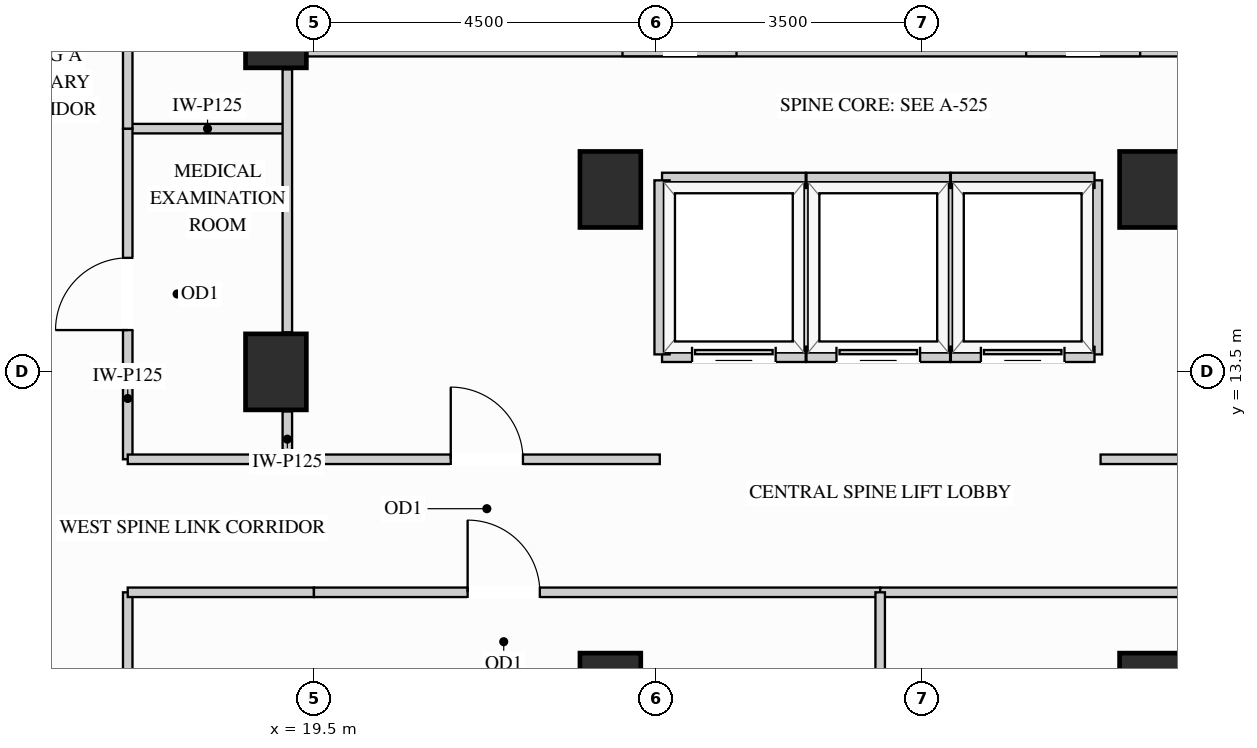
"""IFC4 building model, lengths in metres.
Left out: names, types, materials, properties, quantities, classifications, styles, units other than length and angle.
Written with IfcOpenShell. Run it as: python <this file> out.ifc"""

import sys

from ifc_helpers import new_model, si_unit, direction, frame, frame_2d, origin, origin_2d, place, context, subcontext, project, spatial, rectangle, extrude, source, transform, mapped, element, fill, save


model = new_model("IFC4")
c1 = context("Model", 3, precision=1e-05, world=origin(), true_north=direction((0.0, 1.0)))
c2 = subcontext(c1, "Body", "Model", "MODEL_VIEW")
j1 = project(units=[si_unit("LENGTHUNIT", "METRE"), si_unit("PLANEANGLEUNIT", "RADIAN")], contexts=[c1])
p1 = place(None, origin())
s1 = spatial("IfcSite", under=j1, at=p1, CompositionType="ELEMENT")
p2 = place(p1, origin())
s2 = spatial("IfcBuilding", under=s1, at=p2, CompositionType="ELEMENT")
p3 = place(p2, frame((0.0, 0.0, 157.5)))
s3 = spatial("IfcBuildingStorey", under=s2, at=p3, CompositionType="ELEMENT", Elevation=157.5)
m1 = source(origin(), c2, "Body", "SweptSolid", [
    extrude(rectangle(XDim=0.8, YDim=1.0, at=origin_2d()), origin(), (0.0, 0.0, 1.0), 3.4),
])
for number, where, z_axis, x_axis in (
    (1, (19.0, 13.5, 0.0), (0.0, 0.0, 1.0), (1.0, 0.0, 0.0)),
    (2, (19.0, 18.0, 0.0), (0.0, 0.0, 1.0), (1.0, 0.0, 0.0)),
    (3, (23.4, 15.9, 0.0), (0.0, 0.0, 1.0), (1.0, 0.0, 0.0)),
    (4, (23.4, 9.3, 0.0), (0.0, 0.0, 1.0), (1.0, 0.0, 0.0)),
    (5, (30.5, 15.9, 0.0), (0.0, 0.0, 1.0), (1.0, 0.0, 0.0)),
    (6, (30.5, 9.3, 0.0), (0.0, 0.0, 1.0), (1.0, 0.0, 0.0)),
):
    element("IfcColumn", number, at=place(p3, frame(where, z_axis=z_axis, x_axis=x_axis)), inside=s3, PredefinedType="COLUMN", context=c2, shape_type="MappedRepresentation", body=[
        mapped(m1, transform((0.0, 0.0, 0.0), x_axis=(1.0, 0.0, 0.0), y_axis=(0.0, 1.0, 0.0), z_axis=(0.0, 0.0, 1.0))),
    ])
p4 = place(p3, frame((34.502, 17.825, 0.0), z_axis=(0.0, 0.0, 1.0), x_axis=(-1.0, 0.0, 0.0)))
e7 = element("IfcWall", 7, at=p4, inside=s3, PredefinedType="SOLIDWALL", context=c2, shape_type="SweptSolid", body=[
    extrude(rectangle(XDim=15.104, YDim=0.35, at=frame_2d((7.552, 0.0))), origin(), (0.0, 0.0, 1.0), 3.385),
])
p5 = place(p4, frame((4.131, 0.0, 0.78)))
e8 = element("IfcOpeningElement", 8, at=p5, cuts=e7, PredefinedType="OPENING", context=c2, shape_type="SweptSolid", body=[
    extrude(rectangle(XDim=1.5, YDim=2.0, at=frame_2d((0.75, 1.0))), frame((0.0, 0.185, 0.0), z_axis=(0.0, -1.0, 0.0), x_axis=(1.0, 0.0, 0.0)), (0.0, 0.0, 1.0), 0.37),
])
p6 = place(p4, frame((9.442, 0.0, 0.78)))
e9 = element("IfcOpeningElement", 9, at=p6, cuts=e7, PredefinedType="OPENING", context=c2, shape_type="SweptSolid", body=[
    extrude(rectangle(XDim=1.5, YDim=2.0, at=frame_2d((0.75, 1.0))), frame((0.0, 0.185, 0.0), z_axis=(0.0, -1.0, 0.0), x_axis=(1.0, 0.0, 0.0)), (0.0, 0.0, 1.0), 0.37),
])
m2 = source(origin(), c2, "Body", "SweptSolid", [
    extrude(rectangle(XDim=2.1, YDim=0.125, at=frame_2d((1.05, 0.0))), origin(), (0.0, 0.0, 1.0), 2.916),
])
p7 = place(p3, frame((17.05, 16.7, 0.0), z_axis=(0.0, 0.0, 1.0), x_axis=(1.0, 0.0, 0.0)))
e10 = element("IfcWall", 10, at=p7, inside=s3, PredefinedType="PARTITIONING", context=c2, shape_type="MappedRepresentation", body=[
    mapped(m2, transform((0.0, 0.0, 0.0), x_axis=(1.0, 0.0, 0.0), y_axis=(0.0, 1.0, 0.0), z_axis=(0.0, 0.0, 1.0))),
])
m3 = source(origin(), c2, "Body", "SweptSolid", [
    extrude(rectangle(XDim=0.63, YDim=0.125, at=frame_2d((0.315, 0.0))), origin(), (0.0, 0.0, 1.0), 2.773),
])
p8 = place(p3, frame((19.15, 12.35, 0.0), z_axis=(0.0, 0.0, 1.0), x_axis=(0.0, 1.0, 0.0)))
e11 = element("IfcWall", 11, at=p8, inside=s3, PredefinedType="PARTITIONING", context=c2, shape_type="MappedRepresentation", body=[
    mapped(m3, transform((0.0, 0.0, 0.0), x_axis=(1.0, 0.0, 0.0), y_axis=(0.0, 1.0, 0.0), z_axis=(0.0, 0.0, 1.0))),
])
m4 = source(origin(), c2, "Body", "SweptSolid", [
    extrude(rectangle(XDim=3.46, YDim=0.125, at=frame_2d((1.73, 0.0))), origin(), (0.0, 0.0, 1.0), 2.773),
])
p9 = place(p3, frame((19.15, 14.02, 0.0), z_axis=(0.0, 0.0, 1.0), x_axis=(0.0, 1.0, 0.0)))
e12 = element("IfcWall", 12, at=p9, inside=s3, PredefinedType="PARTITIONING", context=c2, shape_type="MappedRepresentation", body=[
    mapped(m4, transform((0.0, 0.0, 0.0), x_axis=(1.0, 0.0, 0.0), y_axis=(0.0, 1.0, 0.0), z_axis=(0.0, 0.0, 1.0))),
])
p10 = place(p3, frame((17.05, 12.35, 0.0), z_axis=(0.0, 0.0, 1.0), x_axis=(0.0, 1.0, 0.0)))
e13 = element("IfcWall", 13, at=p10, inside=s3, PredefinedType="PARTITIONING", context=c2, shape_type="SweptSolid", body=[
    extrude(rectangle(XDim=4.35, YDim=0.125, at=frame_2d((2.175, 0.0))), origin(), (0.0, 0.0, 1.0), 3.385),
])
p11 = place(p10, frame((1.7, 0.0, 0.0)))
e14 = element("IfcOpeningElement", 14, at=p11, cuts=e13, PredefinedType="OPENING", context=c2, shape_type="SweptSolid", body=[
    extrude(rectangle(XDim=0.95, YDim=2.15, at=frame_2d((0.475, 1.075))), frame((0.0, 0.073, 0.0), z_axis=(0.0, -1.0, 0.0), x_axis=(1.0, 0.0, 0.0)), (0.0, 0.0, 1.0), 0.145),
])
p12 = place(p3, frame((17.05, 16.7, 0.0), z_axis=(0.0, 0.0, 1.0), x_axis=(0.0, 1.0, 0.0)))
e15 = element("IfcWall", 15, at=p12, inside=s3, PredefinedType="PARTITIONING", context=c2, shape_type="SweptSolid", body=[
    extrude(rectangle(XDim=6.65, YDim=0.125, at=frame_2d((3.325, 0.0))), origin(), (0.0, 0.0, 1.0), 3.385),
])
p13 = place(p12, frame((2.85, 0.0, 0.0)))
e16 = element("IfcOpeningElement", 16, at=p13, cuts=e15, PredefinedType="OPENING", context=c2, shape_type="SweptSolid", body=[
    extrude(rectangle(XDim=0.95, YDim=2.15, at=frame_2d((0.475, 1.075))), frame((0.0, 0.073, 0.0), z_axis=(0.0, -1.0, 0.0), x_axis=(1.0, 0.0, 0.0)), (0.0, 0.0, 1.0), 0.145),
])
p14 = place(p3, frame((17.05, 5.75, 0.0), z_axis=(0.0, 0.0, 1.0), x_axis=(0.0, 1.0, 0.0)))
e17 = element("IfcWall", 17, at=p14, inside=s3, PredefinedType="PARTITIONING", context=c2, shape_type="SweptSolid", body=[
    extrude(rectangle(XDim=4.85, YDim=0.125, at=frame_2d((2.425, 0.0))), origin(), (0.0, 0.0, 1.0), 3.385),
])
p15 = place(p14, frame((1.95, 0.0, 0.0)))
e18 = element("IfcOpeningElement", 18, at=p15, cuts=e17, PredefinedType="OPENING", context=c2, shape_type="SweptSolid", body=[
    extrude(rectangle(XDim=0.95, YDim=2.15, at=frame_2d((0.475, 1.075))), frame((0.0, 0.073, 0.0), z_axis=(0.0, -1.0, 0.0), x_axis=(1.0, 0.0, 0.0)), (0.0, 0.0, 1.0), 0.145),
])
p16 = place(p3, frame((29.85, 12.35, 0.0), z_axis=(0.0, 0.0, 1.0), x_axis=(1.0, 0.0, 0.0)))
e19 = element("IfcWall", 19, at=p16, inside=s3, PredefinedType="PARTITIONING", context=c2, shape_type="SweptSolid", body=[
    extrude(rectangle(XDim=4.55, YDim=0.125, at=frame_2d((2.275, 0.0))), origin(), (0.0, 0.0, 1.0), 3.385),
])
p17 = place(p16, frame((1.8, 0.0, 0.0)))
e20 = element("IfcOpeningElement", 20, at=p17, cuts=e19, PredefinedType="OPENING", context=c2, shape_type="SweptSolid", body=[
    extrude(rectangle(XDim=0.95, YDim=2.15, at=frame_2d((0.475, 1.075))), frame((0.0, 0.073, 0.0), z_axis=(0.0, -1.0, 0.0), x_axis=(1.0, 0.0, 0.0)), (0.0, 0.0, 1.0), 0.145),
])
m5 = source(origin(), c2, "Body", "SweptSolid", [
    extrude(rectangle(XDim=2.45, YDim=0.125, at=frame_2d((1.225, 0.0))), origin(), (0.0, 0.0, 1.0), 3.385),
])
p18 = place(p3, frame((17.05, 12.35, 0.0), z_axis=(0.0, 0.0, 1.0), x_axis=(1.0, 0.0, 0.0)))
e21 = element("IfcWall", 21, at=p18, inside=s3, PredefinedType="PARTITIONING", context=c2, shape_type="MappedRepresentation", body=[
    mapped(m5, transform((0.0, 0.0, 0.0), x_axis=(1.0, 0.0, 0.0), y_axis=(0.0, 1.0, 0.0), z_axis=(0.0, 0.0, 1.0))),
])
p19 = place(p3, frame((19.5, 12.35, 0.0), z_axis=(0.0, 0.0, 1.0), x_axis=(1.0, 0.0, 0.0)))
e22 = element("IfcWall", 22, at=p19, inside=s3, PredefinedType="PARTITIONING", context=c2, shape_type="SweptSolid", body=[
    extrude(rectangle(XDim=4.55, YDim=0.125, at=frame_2d((2.275, 0.0))), origin(), (0.0, 0.0, 1.0), 3.385),
])
p20 = place(p19, frame((1.8, 0.0, 0.0)))
e23 = element("IfcOpeningElement", 23, at=p20, cuts=e22, PredefinedType="OPENING", context=c2, shape_type="SweptSolid", body=[
    extrude(rectangle(XDim=0.95, YDim=2.15, at=frame_2d((0.475, 1.075))), frame((0.0, 0.073, 0.0), z_axis=(0.0, -1.0, 0.0), x_axis=(1.0, 0.0, 0.0)), (0.0, 0.0, 1.0), 0.145),
])
p21 = place(p3, frame((17.05, 10.6, 0.0), z_axis=(0.0, 0.0, 1.0), x_axis=(1.0, 0.0, 0.0)))
e24 = element("IfcWall", 24, at=p21, inside=s3, PredefinedType="PARTITIONING", context=c2, shape_type="MappedRepresentation", body=[
    mapped(m5, transform((0.0, 0.0, 0.0), x_axis=(1.0, 0.0, 0.0), y_axis=(0.0, 1.0, 0.0), z_axis=(0.0, 0.0, 1.0))),
])
p22 = place(p3, frame((19.5, 10.6, 0.0), z_axis=(0.0, 0.0, 1.0), x_axis=(1.0, 0.0, 0.0)))
e25 = element("IfcWall", 25, at=p22, inside=s3, PredefinedType="PARTITIONING", context=c2, shape_type="SweptSolid", body=[
    extrude(rectangle(XDim=7.45, YDim=0.125, at=frame_2d((3.725, 0.0))), origin(), (0.0, 0.0, 1.0), 3.385),
])
p23 = place(p22, frame((2.022, 0.0, 0.0)))
e26 = element("IfcOpeningElement", 26, at=p23, cuts=e25, PredefinedType="OPENING", context=c2, shape_type="SweptSolid", body=[
    extrude(rectangle(XDim=0.95, YDim=2.15, at=frame_2d((0.475, 1.075))), frame((0.0, 0.073, 0.0), z_axis=(0.0, -1.0, 0.0), x_axis=(1.0, 0.0, 0.0)), (0.0, 0.0, 1.0), 0.145),
])
p24 = place(p3, frame((26.95, 10.6, 0.0), z_axis=(0.0, 0.0, 1.0), x_axis=(1.0, 0.0, 0.0)))
e27 = element("IfcWall", 27, at=p24, inside=s3, PredefinedType="PARTITIONING", context=c2, shape_type="SweptSolid", body=[
    extrude(rectangle(XDim=7.45, YDim=0.125, at=frame_2d((3.725, 0.0))), origin(), (0.0, 0.0, 1.0), 3.385),
])
p25 = place(p24, frame((4.478, 0.0, 0.0)))
e28 = element("IfcOpeningElement", 28, at=p25, cuts=e27, PredefinedType="OPENING", context=c2, shape_type="SweptSolid", body=[
    extrude(rectangle(XDim=0.95, YDim=2.15, at=frame_2d((0.475, 1.075))), frame((0.0, 0.073, 0.0), z_axis=(0.0, -1.0, 0.0), x_axis=(1.0, 0.0, 0.0)), (0.0, 0.0, 1.0), 0.145),
])
m6 = source(origin(), c2, "Body", "SweptSolid", [
    extrude(rectangle(XDim=1.748, YDim=0.125, at=frame_2d((0.874, 0.0))), origin(), (0.0, 0.0, 1.0), 3.385),
])
p26 = place(p3, frame((26.95, 8.852, 0.0), z_axis=(0.0, 0.0, 1.0), x_axis=(0.0, 1.0, 0.0)))
e29 = element("IfcWall", 29, at=p26, inside=s3, PredefinedType="PARTITIONING", context=c2, shape_type="MappedRepresentation", body=[
    mapped(m6, transform((0.0, 0.0, 0.0), x_axis=(1.0, 0.0, 0.0), y_axis=(0.0, 1.0, 0.0), z_axis=(0.0, 0.0, 1.0))),
])
m7 = source(origin(), c2, "Body", "SweptSolid", [
    extrude(rectangle(XDim=2.29, YDim=0.2, at=frame_2d((1.145, 0.0))), origin(), (0.0, 0.0, 1.0), 3.385),
])
p27 = place(p3, frame((25.97, 13.73, 0.0), z_axis=(0.0, 0.0, 1.0), x_axis=(0.0, 1.0, 0.0)))
e30 = element("IfcWall", 30, at=p27, inside=s3, PredefinedType="PARTITIONING", context=c2, shape_type="MappedRepresentation", body=[
    mapped(m7, transform((0.0, 0.0, 0.0), x_axis=(1.0, 0.0, 0.0), y_axis=(0.0, 1.0, 0.0), z_axis=(0.0, 0.0, 1.0))),
])
m8 = source(origin(), c2, "Body", "SweptSolid", [
    extrude(rectangle(XDim=1.89, YDim=0.2, at=frame_2d((0.945, 0.0))), origin(), (0.0, 0.0, 1.0), 2.773),
])
p28 = place(p3, frame((24.08, 16.02, 0.0), z_axis=(0.0, 0.0, 1.0), x_axis=(1.0, 0.0, 0.0)))
e31 = element("IfcWall", 31, at=p28, inside=s3, PredefinedType="PARTITIONING", context=c2, shape_type="MappedRepresentation", body=[
    mapped(m8, transform((0.0, 0.0, 0.0), x_axis=(1.0, 0.0, 0.0), y_axis=(0.0, 1.0, 0.0), z_axis=(0.0, 0.0, 1.0))),
])
p29 = place(p3, frame((24.08, 13.73, 0.0), z_axis=(0.0, 0.0, 1.0), x_axis=(1.0, 0.0, 0.0)))
e32 = element("IfcWall", 32, at=p29, inside=s3, PredefinedType="PARTITIONING", context=c2, shape_type="SweptSolid", body=[
    extrude(rectangle(XDim=1.89, YDim=0.2, at=frame_2d((0.945, 0.0))), origin(), (0.0, 0.0, 1.0), 2.466),
])
p30 = place(p29, frame((0.395, 0.0, 0.0)))
e33 = element("IfcOpeningElement", 33, at=p30, cuts=e32, PredefinedType="OPENING", context=c2, shape_type="SweptSolid", body=[
    extrude(rectangle(XDim=1.1, YDim=2.2, at=frame_2d((0.55, 1.1))), frame((0.0, 0.11, 0.0), z_axis=(0.0, -1.0, 0.0), x_axis=(1.0, 0.0, 0.0)), (0.0, 0.0, 1.0), 0.22),
])
for number, where, z_axis, x_axis in (
    (34, (24.08, 13.73, 0.0), (0.0, 0.0, 1.0), (0.0, 1.0, 0.0)),
    (35, (27.87, 13.73, 0.0), (0.0, 0.0, 1.0), (0.0, 1.0, 0.0)),
):
    element("IfcWall", number, at=place(p3, frame(where, z_axis=z_axis, x_axis=x_axis)), inside=s3, PredefinedType="PARTITIONING", context=c2, shape_type="MappedRepresentation", body=[
        mapped(m7, transform((0.0, 0.0, 0.0), x_axis=(1.0, 0.0, 0.0), y_axis=(0.0, 1.0, 0.0), z_axis=(0.0, 0.0, 1.0))),
    ])
m9 = source(origin(), c2, "Body", "SweptSolid", [
    extrude(rectangle(XDim=1.89, YDim=0.2, at=frame_2d((0.945, 0.0))), origin(), (0.0, 0.0, 1.0), 2.773),
])
p31 = place(p3, frame((25.98, 16.02, 0.0), z_axis=(0.0, 0.0, 1.0), x_axis=(1.0, 0.0, 0.0)))
e36 = element("IfcWall", 36, at=p31, inside=s3, PredefinedType="PARTITIONING", context=c2, shape_type="MappedRepresentation", body=[
    mapped(m9, transform((0.0, 0.0, 0.0), x_axis=(1.0, 0.0, 0.0), y_axis=(0.0, 1.0, 0.0), z_axis=(0.0, 0.0, 1.0))),
])
p32 = place(p3, frame((25.98, 13.73, 0.0), z_axis=(0.0, 0.0, 1.0), x_axis=(1.0, 0.0, 0.0)))
e37 = element("IfcWall", 37, at=p32, inside=s3, PredefinedType="PARTITIONING", context=c2, shape_type="SweptSolid", body=[
    extrude(rectangle(XDim=1.89, YDim=0.2, at=frame_2d((0.945, 0.0))), origin(), (0.0, 0.0, 1.0), 2.466),
])
p33 = place(p32, frame((0.395, 0.0, 0.0)))
e38 = element("IfcOpeningElement", 38, at=p33, cuts=e37, PredefinedType="OPENING", context=c2, shape_type="SweptSolid", body=[
    extrude(rectangle(XDim=1.1, YDim=2.2, at=frame_2d((0.55, 1.1))), frame((0.0, 0.11, 0.0), z_axis=(0.0, -1.0, 0.0), x_axis=(1.0, 0.0, 0.0)), (0.0, 0.0, 1.0), 0.22),
])
p34 = place(p3, frame((29.77, 13.73, 0.0), z_axis=(0.0, 0.0, 1.0), x_axis=(0.0, 1.0, 0.0)))
e39 = element("IfcWall", 39, at=p34, inside=s3, PredefinedType="PARTITIONING", context=c2, shape_type="MappedRepresentation", body=[
    mapped(m7, transform((0.0, 0.0, 0.0), x_axis=(1.0, 0.0, 0.0), y_axis=(0.0, 1.0, 0.0), z_axis=(0.0, 0.0, 1.0))),
])
p35 = place(p3, frame((27.88, 16.02, 0.0), z_axis=(0.0, 0.0, 1.0), x_axis=(1.0, 0.0, 0.0)))
e40 = element("IfcWall", 40, at=p35, inside=s3, PredefinedType="PARTITIONING", context=c2, shape_type="MappedRepresentation", body=[
    mapped(m9, transform((0.0, 0.0, 0.0), x_axis=(1.0, 0.0, 0.0), y_axis=(0.0, 1.0, 0.0), z_axis=(0.0, 0.0, 1.0))),
])
p36 = place(p3, frame((27.88, 13.73, 0.0), z_axis=(0.0, 0.0, 1.0), x_axis=(1.0, 0.0, 0.0)))
e41 = element("IfcWall", 41, at=p36, inside=s3, PredefinedType="PARTITIONING", context=c2, shape_type="SweptSolid", body=[
    extrude(rectangle(XDim=1.89, YDim=0.2, at=frame_2d((0.945, 0.0))), origin(), (0.0, 0.0, 1.0), 2.466),
])
p37 = place(p36, frame((0.395, 0.0, 0.0)))
e42 = element("IfcOpeningElement", 42, at=p37, cuts=e41, PredefinedType="OPENING", context=c2, shape_type="SweptSolid", body=[
    extrude(rectangle(XDim=1.1, YDim=2.2, at=frame_2d((0.55, 1.1))), frame((0.0, 0.11, 0.0), z_axis=(0.0, -1.0, 0.0), x_axis=(1.0, 0.0, 0.0)), (0.0, 0.0, 1.0), 0.22),
])
m10 = source(origin(), c2, "Body", "SweptSolid", [
    extrude(rectangle(XDim=1.1, YDim=2.2, at=frame_2d((0.55, 1.1))), frame((0.0, 0.025, 0.0), z_axis=(0.0, -1.0, 0.0), x_axis=(1.0, 0.0, 0.0)), (0.0, 0.0, 1.0), 0.05),
])
p38 = place(p30, origin())
e43 = element("IfcDoor", 43, at=p38, inside=s3, OperationType="SLIDING_TO_LEFT", PredefinedType="DOOR", context=c2, shape_type="MappedRepresentation", body=[
    mapped(m10, transform((0.0, 0.0, 0.0), x_axis=(1.0, 0.0, 0.0), y_axis=(0.0, 1.0, 0.0), z_axis=(0.0, 0.0, 1.0))),
])
fill(e33, e43)
p39 = place(p33, origin())
e44 = element("IfcDoor", 44, at=p39, inside=s3, OperationType="SLIDING_TO_LEFT", PredefinedType="DOOR", context=c2, shape_type="MappedRepresentation", body=[
    mapped(m10, transform((0.0, 0.0, 0.0), x_axis=(1.0, 0.0, 0.0), y_axis=(0.0, 1.0, 0.0), z_axis=(0.0, 0.0, 1.0))),
])
fill(e38, e44)
p40 = place(p37, origin())
e45 = element("IfcDoor", 45, at=p40, inside=s3, OperationType="SLIDING_TO_LEFT", PredefinedType="DOOR", context=c2, shape_type="MappedRepresentation", body=[
    mapped(m10, transform((0.0, 0.0, 0.0), x_axis=(1.0, 0.0, 0.0), y_axis=(0.0, 1.0, 0.0), z_axis=(0.0, 0.0, 1.0))),
])
fill(e42, e45)
m11 = source(origin(), c2, "Body", "SweptSolid", [
    extrude(rectangle(XDim=0.95, YDim=2.15, at=frame_2d((0.475, 1.075))), frame((0.0, 0.025, 0.0), z_axis=(0.0, -1.0, 0.0), x_axis=(1.0, 0.0, 0.0)), (0.0, 0.0, 1.0), 0.05),
])
p41 = place(p11, origin())
e46 = element("IfcDoor", 46, at=p41, inside=s3, OperationType="SINGLE_SWING_LEFT", PredefinedType="DOOR", context=c2, shape_type="MappedRepresentation", body=[
    mapped(m11, transform((0.0, 0.0, 0.0), x_axis=(1.0, 0.0, 0.0), y_axis=(0.0, 1.0, 0.0), z_axis=(0.0, 0.0, 1.0))),
])
fill(e14, e46)
p42 = place(p20, origin())
e47 = element("IfcDoor", 47, at=p42, inside=s3, OperationType="SINGLE_SWING_LEFT", PredefinedType="DOOR", context=c2, shape_type="MappedRepresentation", body=[
    mapped(m11, transform((0.0, 0.0, 0.0), x_axis=(1.0, 0.0, 0.0), y_axis=(0.0, 1.0, 0.0), z_axis=(0.0, 0.0, 1.0))),
])
fill(e23, e47)
p43 = place(p23, origin())
e48 = element("IfcDoor", 48, at=p43, inside=s3, OperationType="SINGLE_SWING_LEFT", PredefinedType="DOOR", context=c2, shape_type="MappedRepresentation", body=[
    mapped(m11, transform((0.0, 0.0, 0.0), x_axis=(1.0, 0.0, 0.0), y_axis=(0.0, 1.0, 0.0), z_axis=(0.0, 0.0, 1.0))),
])
fill(e26, e48)
save(model, sys.argv[1])
